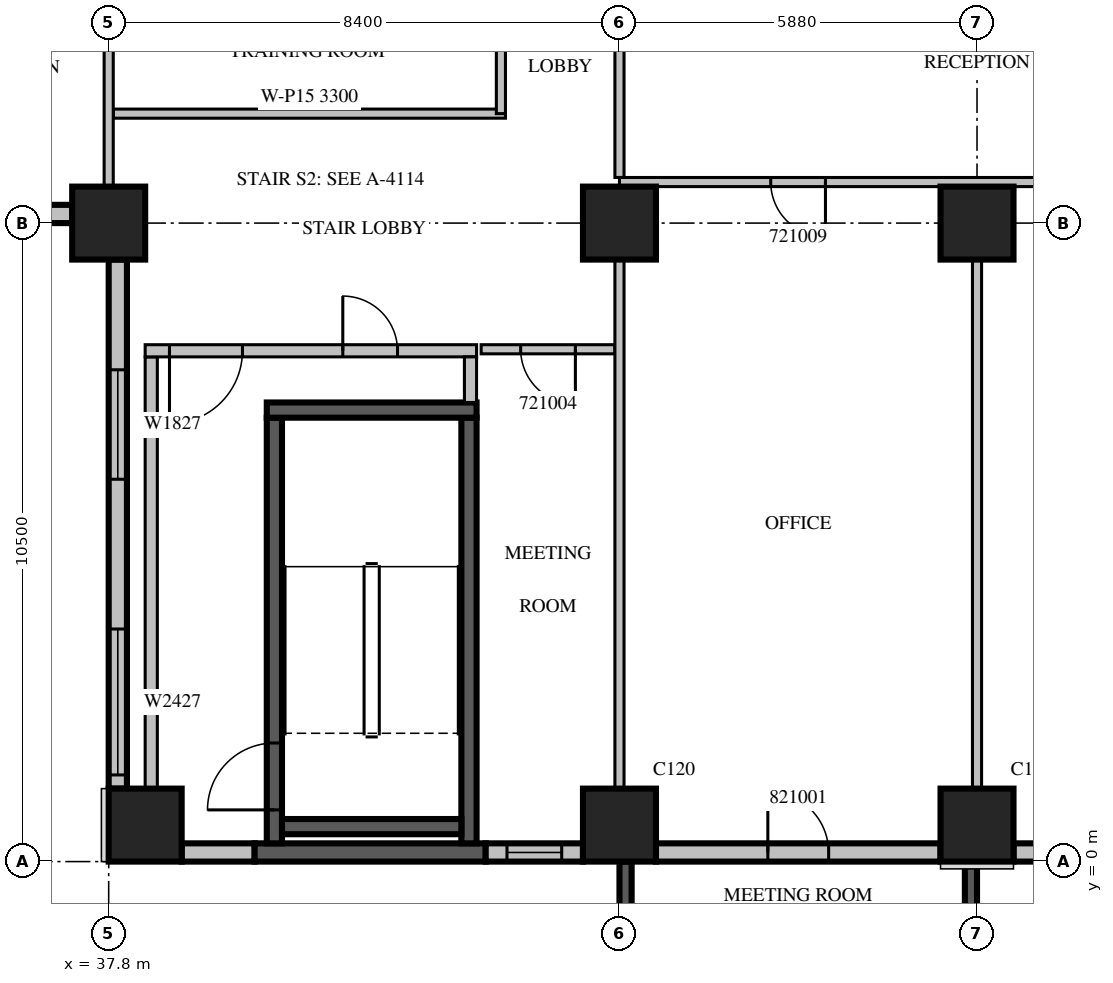
"""IFC4 building model, lengths in metres.
Left out: names, types, materials, properties, quantities, classifications, styles, units other than length and angle.
Written with IfcOpenShell. Run it as: python <this file> out.ifc"""

import sys

from ifc_helpers import new_model, si_unit, direction, frame, frame_2d, origin, origin_2d, place, context, subcontext, project, spatial, rectangle, extrude, source, transform, mapped, element, fill, save


model = new_model("IFC4")
c1 = context("Model", 3, precision=1e-05, world=origin(), true_north=direction((0.0, 1.0)))
c2 = subcontext(c1, "Body", "Model", "MODEL_VIEW")
j1 = project(units=[si_unit("LENGTHUNIT", "METRE"), si_unit("PLANEANGLEUNIT", "RADIAN")], contexts=[c1])
p1 = place(None, origin())
s1 = spatial("IfcSite", under=j1, at=p1, CompositionType="ELEMENT")
p2 = place(p1, origin())
s2 = spatial("IfcBuilding", under=s1, at=p2, CompositionType="ELEMENT")
p3 = place(p2, frame((0.0, 0.0, 99.3)))
s3 = spatial("IfcBuildingStorey", under=s2, at=p3, CompositionType="ELEMENT", Elevation=99.3)
m1 = source(origin(), c2, "Body", "SweptSolid", [
    extrude(rectangle(XDim=1.2, YDim=1.2, at=origin_2d()), origin(), (0.0, 0.0, 1.0), 4.2),
])
for number, where, z_axis, x_axis in (
    (1, (38.4, 0.6, 0.0), (0.0, 0.0, 1.0), (1.0, 0.0, 0.0)),
    (2, (46.2, 0.6, 0.0), (0.0, 0.0, 1.0), (1.0, 0.0, 0.0)),
    (3, (52.08, 0.6, 0.0), (0.0, 0.0, 1.0), (1.0, 0.0, 0.0)),
    (4, (37.8, 10.5, 0.0), (0.0, 0.0, 1.0), (1.0, 0.0, 0.0)),
    (5, (46.2, 10.5, 0.0), (0.0, 0.0, 1.0), (1.0, 0.0, 0.0)),
    (6, (52.08, 10.5, 0.0), (0.0, 0.0, 1.0), (1.0, 0.0, 0.0)),
):
    element("IfcColumn", number, at=place(p3, frame(where, z_axis=z_axis, x_axis=x_axis)), inside=s3, PredefinedType="COLUMN", context=c2, shape_type="MappedRepresentation", body=[
        mapped(m1, transform((0.0, 0.0, 0.0), scale=1.0)),
    ])
m2 = source(origin(), c2, "Body", "SweptSolid", [
    extrude(rectangle(XDim=3.9, YDim=0.2, at=frame_2d((1.95, 0.0))), origin(), (0.0, 0.0, 1.0), 3.8),
])
p4 = place(p3, frame((46.3, 0.0, 0.0), z_axis=(0.0, 0.0, 1.0), x_axis=(0.0, -1.0, 0.0)))
e7 = element("IfcWall", 7, at=p4, inside=s3, PredefinedType="SOLIDWALL", context=c2, shape_type="MappedRepresentation", body=[
    mapped(m2, transform((0.0, 0.0, 0.0), scale=1.0)),
])
m3 = source(origin(), c2, "Body", "SweptSolid", [
    extrude(rectangle(XDim=2.4, YDim=2.7, at=frame_2d((1.2, 1.35))), frame((0.0, 0.11, 0.0), z_axis=(0.0, -1.0, 0.0), x_axis=(1.0, 0.0, 0.0)), (0.0, 0.0, 1.0), 0.22),
])
p5 = place(p4, frame((0.75, 0.0, 0.6)))
e8 = element("IfcOpeningElement", 8, at=p5, cuts=e7, PredefinedType="OPENING", context=c2, shape_type="MappedRepresentation", body=[
    mapped(m3, transform((0.0, 0.0, 0.0), scale=1.0)),
])
p6 = place(p3, frame((51.98, 0.0, 0.0), z_axis=(0.0, 0.0, 1.0), x_axis=(0.0, -1.0, 0.0)))
e9 = element("IfcWall", 9, at=p6, inside=s3, PredefinedType="SOLIDWALL", context=c2, shape_type="MappedRepresentation", body=[
    mapped(m2, transform((0.0, 0.0, 0.0), scale=1.0)),
])
p7 = place(p6, frame((0.75, 0.0, 0.6)))
e10 = element("IfcOpeningElement", 10, at=p7, cuts=e9, PredefinedType="OPENING", context=c2, shape_type="MappedRepresentation", body=[
    mapped(m3, transform((0.0, 0.0, 0.0), scale=1.0)),
])
m4 = source(origin(), c2, "Body", "SweptSolid", [
    extrude(rectangle(XDim=7.2, YDim=0.3, at=frame_2d((3.6, 0.0))), origin(), (0.0, 0.0, 1.0), 2.8),
])
p8 = place(p3, frame((30.0, 10.65, 0.0), z_axis=(0.0, 0.0, 1.0), x_axis=(1.0, 0.0, 0.0)))
e11 = element("IfcWall", 11, at=p8, inside=s3, PredefinedType="STANDARD", context=c2, shape_type="MappedRepresentation", body=[
    mapped(m4, transform((0.0, 0.0, 0.0), scale=1.0)),
])
m5 = source(origin(), c2, "Body", "SweptSolid", [
    extrude(rectangle(XDim=8.7, YDim=0.3, at=frame_2d((4.35, 0.0))), origin(), (0.0, 0.0, 1.0), 3.8),
])
p9 = place(p3, frame((37.95, 9.9, 0.0), z_axis=(0.0, 0.0, 1.0), x_axis=(0.0, -1.0, 0.0)))
e12 = element("IfcWall", 12, at=p9, inside=s3, PredefinedType="STANDARD", context=c2, shape_type="MappedRepresentation", body=[
    mapped(m5, transform((0.0, 0.0, 0.0), scale=1.0)),
])
m6 = source(origin(), c2, "Body", "SweptSolid", [
    extrude(rectangle(XDim=1.8, YDim=2.7, at=frame_2d((0.9, 1.35))), frame((0.0, 0.16, 0.0), z_axis=(0.0, -1.0, 0.0), x_axis=(1.0, 0.0, 0.0)), (0.0, 0.0, 1.0), 0.32),
])
p10 = place(p9, frame((1.812, 0.0, 0.6)))
e13 = element("IfcOpeningElement", 13, at=p10, cuts=e12, PredefinedType="OPENING", context=c2, shape_type="MappedRepresentation", body=[
    mapped(m6, transform((0.0, 0.0, 0.0), scale=1.0)),
])
m7 = source(origin(), c2, "Body", "SweptSolid", [
    extrude(rectangle(XDim=2.4, YDim=2.7, at=frame_2d((1.2, 1.35))), frame((0.0, 0.16, 0.0), z_axis=(0.0, -1.0, 0.0), x_axis=(1.0, 0.0, 0.0)), (0.0, 0.0, 1.0), 0.32),
])
p11 = place(p9, frame((6.075, 0.0, 0.6)))
e14 = element("IfcOpeningElement", 14, at=p11, cuts=e12, PredefinedType="OPENING", context=c2, shape_type="MappedRepresentation", body=[
    mapped(m7, transform((0.0, 0.0, 0.0), scale=1.0)),
])
m8 = source(origin(), c2, "Body", "SweptSolid", [
    extrude(rectangle(XDim=1.2, YDim=0.3, at=frame_2d((0.6, 0.0))), origin(), (0.0, 0.0, 1.0), 3.8),
])
p12 = place(p3, frame((39.0, 0.15, 0.0), z_axis=(0.0, 0.0, 1.0), x_axis=(1.0, 0.0, 0.0)))
e15 = element("IfcWall", 15, at=p12, inside=s3, PredefinedType="STANDARD", context=c2, shape_type="MappedRepresentation", body=[
    mapped(m8, transform((0.0, 0.0, 0.0), scale=1.0)),
])
m9 = source(origin(), c2, "Body", "SweptSolid", [
    extrude(rectangle(XDim=3.8, YDim=0.3, at=frame_2d((1.9, 0.0))), origin(), (0.0, 0.0, 1.0), 3.8),
])
p13 = place(p3, frame((40.2, 0.15, 0.0), z_axis=(0.0, 0.0, 1.0), x_axis=(1.0, 0.0, 0.0)))
e16 = element("IfcWall", 16, at=p13, inside=s3, PredefinedType="SOLIDWALL", context=c2, shape_type="MappedRepresentation", body=[
    mapped(m9, transform((0.0, 0.0, 0.0), scale=1.0)),
])
m10 = source(origin(), c2, "Body", "SweptSolid", [
    extrude(rectangle(XDim=1.6, YDim=0.3, at=frame_2d((0.8, 0.0))), origin(), (0.0, 0.0, 1.0), 3.8),
])
p14 = place(p3, frame((44.0, 0.15, 0.0), z_axis=(0.0, 0.0, 1.0), x_axis=(1.0, 0.0, 0.0)))
e17 = element("IfcWall", 17, at=p14, inside=s3, PredefinedType="STANDARD", context=c2, shape_type="MappedRepresentation", body=[
    mapped(m10, transform((0.0, 0.0, 0.0), scale=1.0)),
])
m11 = source(origin(), c2, "Body", "SweptSolid", [
    extrude(rectangle(XDim=0.9, YDim=2.7, at=frame_2d((0.45, 1.35))), frame((0.0, 0.16, 0.0), z_axis=(0.0, -1.0, 0.0), x_axis=(1.0, 0.0, 0.0)), (0.0, 0.0, 1.0), 0.32),
])
p15 = place(p14, frame((0.35, 0.0, 0.6)))
e18 = element("IfcOpeningElement", 18, at=p15, cuts=e17, PredefinedType="OPENING", context=c2, shape_type="MappedRepresentation", body=[
    mapped(m11, transform((0.0, 0.0, 0.0), scale=1.0)),
])
m12 = source(origin(), c2, "Body", "SweptSolid", [
    extrude(rectangle(XDim=4.68, YDim=0.3, at=frame_2d((2.34, 0.0))), origin(), (0.0, 0.0, 1.0), 3.8),
])
p16 = place(p3, frame((46.8, 0.15, 0.0), z_axis=(0.0, 0.0, 1.0), x_axis=(1.0, 0.0, 0.0)))
e19 = element("IfcWall", 19, at=p16, inside=s3, PredefinedType="STANDARD", context=c2, shape_type="MappedRepresentation", body=[
    mapped(m12, transform((0.0, 0.0, 0.0), scale=1.0)),
])
m13 = source(origin(), c2, "Body", "SweptSolid", [
    extrude(rectangle(XDim=1.0, YDim=2.1, at=frame_2d((0.5, 1.05))), frame((0.0, 0.16, 0.0), z_axis=(0.0, -1.0, 0.0), x_axis=(1.0, 0.0, 0.0)), (0.0, 0.0, 1.0), 0.32),
])
p17 = place(p16, frame((1.84, 0.0, 0.0)))
e20 = element("IfcOpeningElement", 20, at=p17, cuts=e19, PredefinedType="OPENING", context=c2, shape_type="MappedRepresentation", body=[
    mapped(m13, transform((0.0, 0.0, 0.0), scale=1.0)),
])
p18 = place(p3, frame((52.68, 0.15, 0.0), z_axis=(0.0, 0.0, 1.0), x_axis=(1.0, 0.0, 0.0)))
e21 = element("IfcWall", 21, at=p18, inside=s3, PredefinedType="STANDARD", context=c2, shape_type="MappedRepresentation", body=[
    mapped(m12, transform((0.0, 0.0, 0.0), scale=1.0)),
])
m14 = source(origin(), c2, "Body", "SweptSolid", [
    extrude(rectangle(XDim=3.6, YDim=2.7, at=frame_2d((1.8, 1.35))), frame((0.0, 0.16, 0.0), z_axis=(0.0, -1.0, 0.0), x_axis=(1.0, 0.0, 0.0)), (0.0, 0.0, 1.0), 0.32),
])
p19 = place(p18, frame((0.54, 0.0, 0.6)))
e22 = element("IfcOpeningElement", 22, at=p19, cuts=e21, PredefinedType="OPENING", context=c2, shape_type="MappedRepresentation", body=[
    mapped(m14, transform((0.0, 0.0, 0.0), scale=1.0)),
])
m15 = source(origin(), c2, "Body", "SweptSolid", [
    extrude(rectangle(XDim=7.0, YDim=0.25, at=frame_2d((3.5, 0.0))), origin(), (0.0, 0.0, 1.0), 3.8),
])
p20 = place(p3, frame((40.525, 0.3, 0.0), z_axis=(0.0, 0.0, 1.0), x_axis=(0.0, 1.0, 0.0)))
e23 = element("IfcWall", 23, at=p20, inside=s3, PredefinedType="SOLIDWALL", context=c2, shape_type="MappedRepresentation", body=[
    mapped(m15, transform((0.0, 0.0, 0.0), scale=1.0)),
])
m16 = source(origin(), c2, "Body", "SweptSolid", [
    extrude(rectangle(XDim=1.1, YDim=2.1, at=frame_2d((0.55, 1.05))), frame((0.0, 0.135, 0.0), z_axis=(0.0, -1.0, 0.0), x_axis=(1.0, 0.0, 0.0)), (0.0, 0.0, 1.0), 0.27),
])
p21 = place(p20, frame((0.55, 0.0, 0.0)))
e24 = element("IfcOpeningElement", 24, at=p21, cuts=e23, PredefinedType="OPENING", context=c2, shape_type="MappedRepresentation", body=[
    mapped(m16, transform((0.0, 0.0, 0.0), scale=1.0)),
])
p22 = place(p3, frame((43.725, 0.3, 0.0), z_axis=(0.0, 0.0, 1.0), x_axis=(0.0, 1.0, 0.0)))
e25 = element("IfcWall", 25, at=p22, inside=s3, PredefinedType="SOLIDWALL", context=c2, shape_type="MappedRepresentation", body=[
    mapped(m15, transform((0.0, 0.0, 0.0), scale=1.0)),
])
m17 = source(origin(), c2, "Body", "SweptSolid", [
    extrude(rectangle(XDim=3.45, YDim=0.25, at=frame_2d((1.725, 0.0))), origin(), (0.0, 0.0, 1.0), 3.8),
])
p23 = place(p3, frame((40.4, 7.425, 0.0), z_axis=(0.0, 0.0, 1.0), x_axis=(1.0, 0.0, 0.0)))
e26 = element("IfcWall", 26, at=p23, inside=s3, PredefinedType="SOLIDWALL", context=c2, shape_type="MappedRepresentation", body=[
    mapped(m17, transform((0.0, 0.0, 0.0), scale=1.0)),
])
m18 = source(origin(), c2, "Body", "SweptSolid", [
    extrude(rectangle(XDim=2.95, YDim=0.25, at=frame_2d((1.475, 0.0))), origin(), (0.0, 0.0, 1.0), 3.8),
])
p24 = place(p3, frame((40.65, 0.575, 0.0), z_axis=(0.0, 0.0, 1.0), x_axis=(1.0, 0.0, 0.0)))
e27 = element("IfcWall", 27, at=p24, inside=s3, PredefinedType="SOLIDWALL", context=c2, shape_type="MappedRepresentation", body=[
    mapped(m18, transform((0.0, 0.0, 0.0), scale=1.0)),
])
m19 = source(origin(), c2, "Body", "SweptSolid", [
    extrude(rectangle(XDim=8.0, YDim=0.2, at=frame_2d((4.0, 0.0))), origin(), (0.0, 0.0, 1.0), 3.8),
])
p25 = place(p3, frame((38.5, 0.3, 0.0), z_axis=(0.0, 0.0, 1.0), x_axis=(0.0, 1.0, 0.0)))
e28 = element("IfcWall", 28, at=p25, inside=s3, PredefinedType="PARTITIONING", context=c2, shape_type="MappedRepresentation", body=[
    mapped(m19, transform((0.0, 0.0, 0.0), scale=1.0)),
])
m20 = source(origin(), c2, "Body", "SweptSolid", [
    extrude(rectangle(XDim=5.45, YDim=0.2, at=frame_2d((2.725, 0.0))), origin(), (0.0, 0.0, 1.0), 3.8),
])
p26 = place(p3, frame((38.4, 8.4, 0.0), z_axis=(0.0, 0.0, 1.0), x_axis=(1.0, 0.0, 0.0)))
e29 = element("IfcWall", 29, at=p26, inside=s3, PredefinedType="PARTITIONING", context=c2, shape_type="MappedRepresentation", body=[
    mapped(m20, transform((0.0, 0.0, 0.0), scale=1.0)),
])
m21 = source(origin(), c2, "Body", "SweptSolid", [
    extrude(rectangle(XDim=1.2, YDim=2.1, at=frame_2d((0.6, 1.05))), frame((0.0, 0.11, 0.0), z_axis=(0.0, -1.0, 0.0), x_axis=(1.0, 0.0, 0.0)), (0.0, 0.0, 1.0), 0.22),
])
p27 = place(p26, frame((0.4, 0.0, 0.0)))
e30 = element("IfcOpeningElement", 30, at=p27, cuts=e29, PredefinedType="OPENING", context=c2, shape_type="MappedRepresentation", body=[
    mapped(m21, transform((0.0, 0.0, 0.0), scale=1.0)),
])
m22 = source(origin(), c2, "Body", "SweptSolid", [
    extrude(rectangle(XDim=0.9, YDim=2.1, at=frame_2d((0.45, 1.05))), frame((0.0, 0.11, 0.0), z_axis=(0.0, -1.0, 0.0), x_axis=(1.0, 0.0, 0.0)), (0.0, 0.0, 1.0), 0.22),
])
p28 = place(p26, frame((3.25, 0.0, 0.0)))
e31 = element("IfcOpeningElement", 31, at=p28, cuts=e29, PredefinedType="OPENING", context=c2, shape_type="MappedRepresentation", body=[
    mapped(m22, transform((0.0, 0.0, 0.0), scale=1.0)),
])
m23 = source(origin(), c2, "Body", "SweptSolid", [
    extrude(rectangle(XDim=0.75, YDim=0.2, at=frame_2d((0.375, 0.0))), origin(), (0.0, 0.0, 1.0), 3.8),
])
p29 = place(p3, frame((43.75, 7.55, 0.0), z_axis=(0.0, 0.0, 1.0), x_axis=(0.0, 1.0, 0.0)))
e32 = element("IfcWall", 32, at=p29, inside=s3, PredefinedType="PARTITIONING", context=c2, shape_type="MappedRepresentation", body=[
    mapped(m23, transform((0.0, 0.0, 0.0), scale=1.0)),
])
p30 = place(p3, frame((37.875, 12.3, 0.0), z_axis=(0.0, 0.0, 1.0), x_axis=(1.0, 0.0, 0.0)))
e33 = element("IfcWall", 33, at=p30, inside=s3, PredefinedType="PARTITIONING", context=c2, shape_type="SweptSolid", body=[
    extrude(rectangle(XDim=6.45, YDim=0.15, at=frame_2d((3.225, 0.0))), origin(), (0.0, 0.0, 1.0), 3.3),
])
m24 = source(origin(), c2, "Body", "SweptSolid", [
    extrude(rectangle(XDim=2.775, YDim=0.15, at=frame_2d((1.387, 0.0))), origin(), (0.0, 0.0, 1.0), 3.8),
])
p31 = place(p3, frame((44.25, 12.3, 0.0), z_axis=(0.0, 0.0, 1.0), x_axis=(0.0, 1.0, 0.0)))
e34 = element("IfcWall", 34, at=p31, inside=s3, PredefinedType="PARTITIONING", context=c2, shape_type="MappedRepresentation", body=[
    mapped(m24, transform((0.0, 0.0, 0.0), scale=1.0)),
])
m25 = source(origin(), c2, "Body", "SweptSolid", [
    extrude(rectangle(XDim=2.2, YDim=0.15, at=frame_2d((1.1, 0.0))), origin(), (0.0, 0.0, 1.0), 3.8),
])
p32 = place(p3, frame((46.125, 8.425, 0.0), z_axis=(0.0, 0.0, 1.0), x_axis=(-1.0, 0.0, 0.0)))
e35 = element("IfcWall", 35, at=p32, inside=s3, PredefinedType="PARTITIONING", context=c2, shape_type="MappedRepresentation", body=[
    mapped(m25, transform((0.0, 0.0, 0.0), scale=1.0)),
])
m26 = source(origin(), c2, "Body", "SweptSolid", [
    extrude(rectangle(XDim=0.9, YDim=2.1, at=frame_2d((0.45, 1.05))), frame((0.0, 0.085, 0.0), z_axis=(0.0, -1.0, 0.0), x_axis=(1.0, 0.0, 0.0)), (0.0, 0.0, 1.0), 0.17),
])
p33 = place(p32, frame((0.65, 0.0, 0.0)))
e36 = element("IfcOpeningElement", 36, at=p33, cuts=e35, PredefinedType="OPENING", context=c2, shape_type="MappedRepresentation", body=[
    mapped(m26, transform((0.0, 0.0, 0.0), scale=1.0)),
])
m27 = source(origin(), c2, "Body", "SweptSolid", [
    extrude(rectangle(XDim=3.901, YDim=0.15, at=frame_2d((1.95, 0.0))), origin(), (0.0, 0.0, 1.0), 3.8),
])
p34 = place(p3, frame((37.8, 11.099, 0.0), z_axis=(0.0, 0.0, 1.0), x_axis=(0.0, 1.0, 0.0)))
e37 = element("IfcWall", 37, at=p34, inside=s3, PredefinedType="PARTITIONING", context=c2, shape_type="MappedRepresentation", body=[
    mapped(m27, transform((0.0, 0.0, 0.0), scale=1.0)),
])
m28 = source(origin(), c2, "Body", "SweptSolid", [
    extrude(rectangle(XDim=8.702, YDim=0.15, at=frame_2d((4.351, 0.0))), origin(), (0.0, 0.0, 1.0), 3.8),
])
for number, where, z_axis, x_axis in (
    (38, (52.08, 1.199, 0.0), (0.0, 0.0, 1.0), (0.0, 1.0, 0.0)),
    (39, (46.2, 1.199, 0.0), (0.0, 0.0, 1.0), (0.0, 1.0, 0.0)),
):
    element("IfcWall", number, at=place(p3, frame(where, z_axis=z_axis, x_axis=x_axis)), inside=s3, PredefinedType="PARTITIONING", context=c2, shape_type="MappedRepresentation", body=[
        mapped(m28, transform((0.0, 0.0, 0.0), scale=1.0)),
    ])
m29 = source(origin(), c2, "Body", "SweptSolid", [
    extrude(rectangle(XDim=3.75, YDim=0.15, at=frame_2d((1.875, 0.0))), origin(), (0.0, 0.0, 1.0), 3.8),
])
p35 = place(p3, frame((46.2, 11.25, 0.0), z_axis=(0.0, 0.0, 1.0), x_axis=(0.0, 1.0, 0.0)))
e40 = element("IfcWall", 40, at=p35, inside=s3, PredefinedType="PARTITIONING", context=c2, shape_type="MappedRepresentation", body=[
    mapped(m29, transform((0.0, 0.0, 0.0), scale=1.0)),
])
m30 = source(origin(), c2, "Body", "SweptSolid", [
    extrude(rectangle(XDim=24.9, YDim=0.15, at=frame_2d((12.45, 0.0))), origin(), (0.0, 0.0, 1.0), 3.8),
])
p36 = place(p3, frame((71.1, 11.175, 0.0), z_axis=(0.0, 0.0, 1.0), x_axis=(-1.0, 0.0, 0.0)))
e41 = element("IfcWall", 41, at=p36, inside=s3, PredefinedType="PARTITIONING", context=c2, shape_type="MappedRepresentation", body=[
    mapped(m30, transform((0.0, 0.0, 0.0), scale=1.0)),
])
p37 = place(p36, frame((21.512, 0.0, 0.0)))
e42 = element("IfcOpeningElement", 42, at=p37, cuts=e41, PredefinedType="OPENING", context=c2, shape_type="MappedRepresentation", body=[
    mapped(m26, transform((0.0, 0.0, 0.0), scale=1.0)),
])
p38 = place(p36, frame((15.633, 0.0, 0.0)))
e43 = element("IfcOpeningElement", 43, at=p38, cuts=e41, PredefinedType="OPENING", context=c2, shape_type="MappedRepresentation", body=[
    mapped(m26, transform((0.0, 0.0, 0.0), scale=1.0)),
])
m31 = source(origin(), c2, "Body", "SweptSolid", [
    extrude(rectangle(XDim=1.1, YDim=2.1, at=frame_2d((0.55, 1.05))), frame((0.0, 0.085, 0.0), z_axis=(0.0, -1.0, 0.0), x_axis=(1.0, 0.0, 0.0)), (0.0, 0.0, 1.0), 0.17),
])
p39 = place(p36, frame((10.654, 0.0, 0.0)))
e44 = element("IfcOpeningElement", 44, at=p39, cuts=e41, PredefinedType="OPENING", context=c2, shape_type="MappedRepresentation", body=[
    mapped(m31, transform((0.0, 0.0, 0.0), scale=1.0)),
])
m32 = source(origin(), c2, "Body", "SweptSolid", [
    extrude(rectangle(XDim=1.8, YDim=2.7, at=frame_2d((0.9, 1.35))), frame((0.0, 0.03, 0.0), z_axis=(0.0, -1.0, 0.0), x_axis=(1.0, 0.0, 0.0)), (0.0, 0.0, 1.0), 0.06),
])
p40 = place(p10, origin())
e45 = element("IfcWindow", 45, at=p40, inside=s3, PartitioningType="SINGLE_PANEL", PredefinedType="WINDOW", context=c2, shape_type="MappedRepresentation", body=[
    mapped(m32, transform((0.0, 0.0, 0.0), scale=1.0)),
])
fill(e13, e45)
m33 = source(origin(), c2, "Body", "SweptSolid", [
    extrude(rectangle(XDim=2.4, YDim=2.7, at=frame_2d((1.2, 1.35))), frame((0.0, 0.03, 0.0), z_axis=(0.0, -1.0, 0.0), x_axis=(1.0, 0.0, 0.0)), (0.0, 0.0, 1.0), 0.06),
])
p41 = place(p11, origin())
e46 = element("IfcWindow", 46, at=p41, inside=s3, PartitioningType="SINGLE_PANEL", PredefinedType="WINDOW", context=c2, shape_type="MappedRepresentation", body=[
    mapped(m33, transform((0.0, 0.0, 0.0), scale=1.0)),
])
fill(e14, e46)
m34 = source(origin(), c2, "Body", "SweptSolid", [
    extrude(rectangle(XDim=0.9, YDim=2.7, at=frame_2d((0.45, 1.35))), frame((0.0, 0.03, 0.0), z_axis=(0.0, -1.0, 0.0), x_axis=(1.0, 0.0, 0.0)), (0.0, 0.0, 1.0), 0.06),
])
p42 = place(p15, origin())
e47 = element("IfcWindow", 47, at=p42, inside=s3, PartitioningType="SINGLE_PANEL", PredefinedType="WINDOW", context=c2, shape_type="MappedRepresentation", body=[
    mapped(m34, transform((0.0, 0.0, 0.0), scale=1.0)),
])
fill(e18, e47)
m35 = source(origin(), c2, "Body", "SweptSolid", [
    extrude(rectangle(XDim=1.1, YDim=2.1, at=frame_2d((0.55, 1.05))), frame((0.0, 0.025, 0.0), z_axis=(0.0, -1.0, 0.0), x_axis=(1.0, 0.0, 0.0)), (0.0, 0.0, 1.0), 0.05),
])
p43 = place(p21, origin())
e48 = element("IfcDoor", 48, at=p43, inside=s3, OperationType="SINGLE_SWING_LEFT", PredefinedType="DOOR", context=c2, shape_type="MappedRepresentation", body=[
    mapped(m35, transform((0.0, 0.0, 0.0), scale=1.0)),
])
fill(e24, e48)
m36 = source(origin(), c2, "Body", "SweptSolid", [
    extrude(rectangle(XDim=1.2, YDim=2.1, at=frame_2d((0.6, 1.05))), frame((0.0, 0.025, 0.0), z_axis=(0.0, -1.0, 0.0), x_axis=(1.0, 0.0, 0.0)), (0.0, 0.0, 1.0), 0.05),
])
p44 = place(p27, origin())
e49 = element("IfcDoor", 49, at=p44, inside=s3, OperationType="SINGLE_SWING_RIGHT", PredefinedType="DOOR", context=c2, shape_type="MappedRepresentation", body=[
    mapped(m36, transform((0.0, 0.0, 0.0), scale=1.0)),
])
fill(e30, e49)
m37 = source(origin(), c2, "Body", "SweptSolid", [
    extrude(rectangle(XDim=0.9, YDim=2.1, at=frame_2d((0.45, 1.05))), frame((0.0, 0.025, 0.0), z_axis=(0.0, -1.0, 0.0), x_axis=(1.0, 0.0, 0.0)), (0.0, 0.0, 1.0), 0.05),
])
p45 = place(p28, origin())
e50 = element("IfcDoor", 50, at=p45, inside=s3, OperationType="SINGLE_SWING_LEFT", PredefinedType="DOOR", context=c2, shape_type="MappedRepresentation", body=[
    mapped(m37, transform((0.0, 0.0, 0.0), scale=1.0)),
])
fill(e31, e50)
p46 = place(p33, origin())
e51 = element("IfcDoor", 51, at=p46, inside=s3, OperationType="SINGLE_SWING_LEFT", PredefinedType="DOOR", context=c2, shape_type="MappedRepresentation", body=[
    mapped(m37, transform((0.0, 0.0, 0.0), scale=1.0)),
])
fill(e36, e51)
p47 = place(p37, origin())
e52 = element("IfcDoor", 52, at=p47, inside=s3, OperationType="SINGLE_SWING_LEFT", PredefinedType="DOOR", context=c2, shape_type="MappedRepresentation", body=[
    mapped(m37, transform((0.0, 0.0, 0.0), scale=1.0)),
])
fill(e42, e52)
m38 = source(origin(), c2, "Body", "SweptSolid", [
    extrude(rectangle(XDim=1.0, YDim=2.1, at=frame_2d((0.5, 1.05))), frame((0.0, 0.025, 0.0), z_axis=(0.0, -1.0, 0.0), x_axis=(1.0, 0.0, 0.0)), (0.0, 0.0, 1.0), 0.05),
])
p48 = place(p17, origin())
e53 = element("IfcDoor", 53, at=p48, inside=s3, OperationType="SINGLE_SWING_LEFT", PredefinedType="DOOR", context=c2, shape_type="MappedRepresentation", body=[
    mapped(m38, transform((0.0, 0.0, 0.0), scale=1.0)),
])
fill(e20, e53)
save(model, sys.argv[1])
